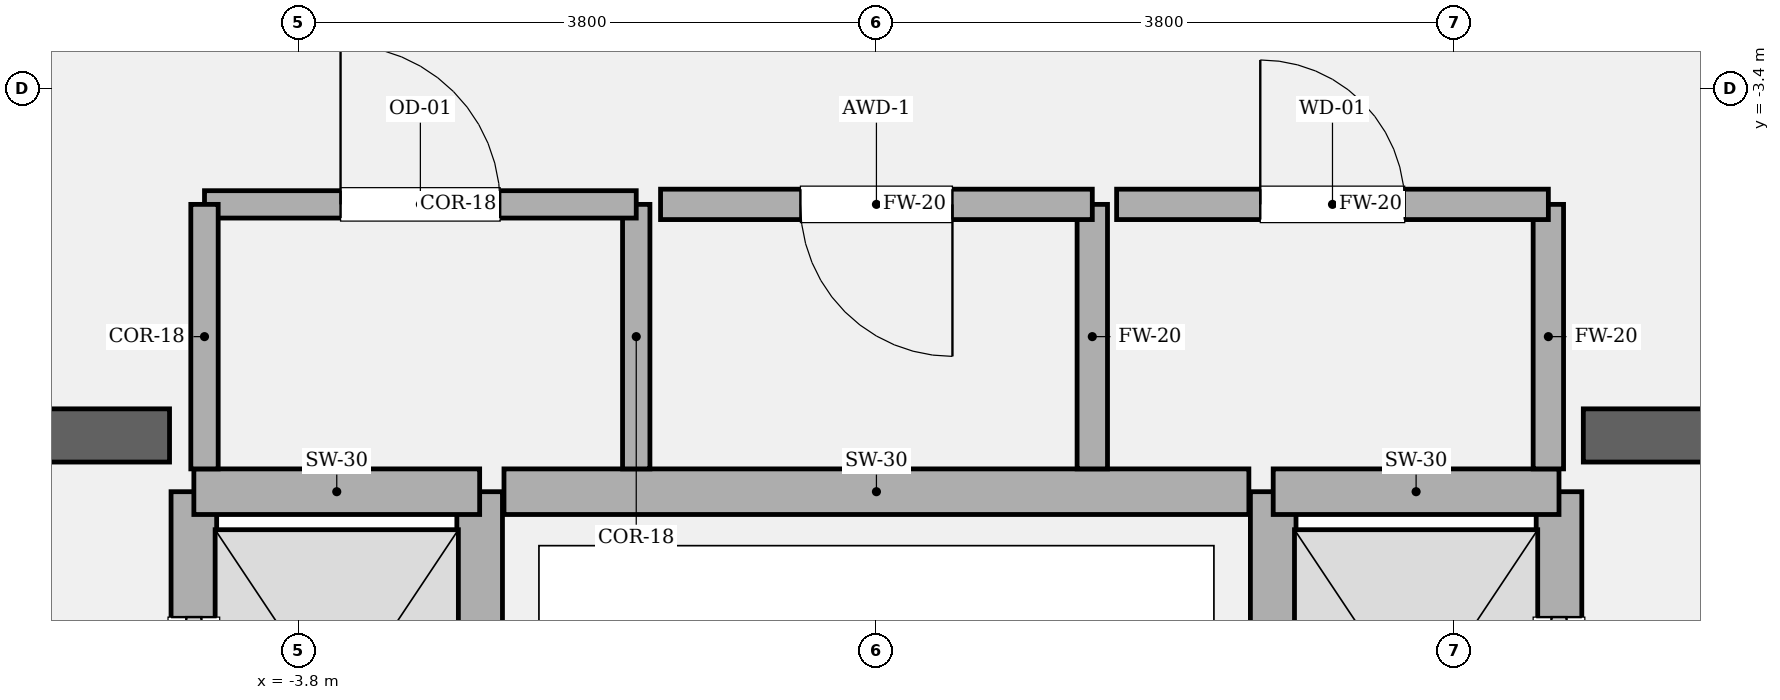
"""IFC4 building model, lengths in metres.
Left out: names, types, materials, properties, quantities, classifications, styles, units other than length and angle.
Written with IfcOpenShell. Run it as: python <this file> out.ifc"""

import sys

from ifc_helpers import new_model, si_unit, direction, frame, frame_2d, origin, place, context, subcontext, project, spatial, rectangle, extrude, element, fill, save


model = new_model("IFC4")
c1 = context("Model", 3, precision=1e-05, world=origin(), true_north=direction((0.0, 1.0)))
c2 = subcontext(c1, "Body", "Model", "MODEL_VIEW")
j1 = project(units=[si_unit("LENGTHUNIT", "METRE"), si_unit("PLANEANGLEUNIT", "RADIAN")], contexts=[c1])
p1 = place(None, origin())
s1 = spatial("IfcSite", under=j1, at=p1, CompositionType="ELEMENT")
p2 = place(p1, origin())
s2 = spatial("IfcBuilding", under=s1, at=p2, CompositionType="ELEMENT")
p3 = place(p2, frame((0.0, 0.0, 97.05)))
s3 = spatial("IfcBuildingStorey", under=s2, at=p3, CompositionType="ELEMENT", Elevation=97.05)
p4 = place(p3, frame((-9.825, -5.68, 0.0), z_axis=(0.0, 0.0, 1.0), x_axis=(1.0, 0.0, 0.0)))
e1 = element("IfcWall", 1, at=p4, inside=s3, PredefinedType="SOLIDWALL", context=c2, shape_type="SweptSolid", body=[
    extrude(rectangle(XDim=5.175, YDim=0.35, at=frame_2d((2.587, 0.0))), origin(), (0.0, 0.0, 1.0), 4.05),
])
p5 = place(p4, frame((1.285, 0.0, 0.0)))
e2 = element("IfcOpeningElement", 2, at=p5, cuts=e1, PredefinedType="OPENING", context=c2, shape_type="SweptSolid", body=[
    extrude(rectangle(XDim=1.18, YDim=2.2, at=frame_2d((0.59, 1.1))), frame((0.0, 0.185, 0.0), z_axis=(0.0, -1.0, 0.0), x_axis=(1.0, 0.0, 0.0)), (0.0, 0.0, 1.0), 0.37),
])
p6 = place(p3, frame((4.65, -5.68, 0.0), z_axis=(0.0, 0.0, 1.0), x_axis=(1.0, 0.0, 0.0)))
e3 = element("IfcWall", 3, at=p6, inside=s3, PredefinedType="SOLIDWALL", context=c2, shape_type="SweptSolid", body=[
    extrude(rectangle(XDim=5.175, YDim=0.35, at=frame_2d((2.587, 0.0))), origin(), (0.0, 0.0, 1.0), 4.05),
])
p7 = place(p6, frame((2.71, 0.0, 0.0)))
e4 = element("IfcOpeningElement", 4, at=p7, cuts=e3, PredefinedType="OPENING", context=c2, shape_type="SweptSolid", body=[
    extrude(rectangle(XDim=1.18, YDim=2.2, at=frame_2d((0.59, 1.1))), frame((0.0, 0.185, 0.0), z_axis=(0.0, -1.0, 0.0), x_axis=(1.0, 0.0, 0.0)), (0.0, 0.0, 1.0), 0.37),
])
p8 = place(p3, frame((-4.49, -8.82, 0.0), z_axis=(0.0, 0.0, 1.0), x_axis=(0.0, 1.0, 0.0)))
e5 = element("IfcWall", 5, at=p8, inside=s3, PredefinedType="SOLIDWALL", context=c2, shape_type="SweptSolid", body=[
    extrude(rectangle(XDim=2.77, YDim=0.3, at=frame_2d((1.385, 0.0))), origin(), (0.0, 0.0, 1.0), 3.81),
])
p9 = place(p8, frame((0.825, 0.0, 0.0)))
e6 = element("IfcOpeningElement", 6, at=p9, cuts=e5, PredefinedType="OPENING", context=c2, shape_type="SweptSolid", body=[
    extrude(rectangle(XDim=1.12, YDim=2.25, at=frame_2d((0.56, 1.125))), frame((0.0, 0.16, 0.0), z_axis=(0.0, -1.0, 0.0), x_axis=(1.0, 0.0, 0.0)), (0.0, 0.0, 1.0), 0.32),
])
p10 = place(p3, frame((-2.61, -8.82, 0.0), z_axis=(0.0, 0.0, 1.0), x_axis=(0.0, 1.0, 0.0)))
e7 = element("IfcWall", 7, at=p10, inside=s3, PredefinedType="SOLIDWALL", context=c2, shape_type="SweptSolid", body=[
    extrude(rectangle(XDim=2.77, YDim=0.3, at=frame_2d((1.385, 0.0))), origin(), (0.0, 0.0, 1.0), 3.81),
])
p11 = place(p3, frame((-4.49, -6.05, 0.0), z_axis=(0.0, 0.0, 1.0), x_axis=(1.0, 0.0, 0.0)))
e8 = element("IfcWall", 8, at=p11, inside=s3, PredefinedType="SOLIDWALL", context=c2, shape_type="SweptSolid", body=[
    extrude(rectangle(XDim=1.88, YDim=0.3, at=frame_2d((0.94, 0.0))), origin(), (0.0, 0.0, 1.0), 3.81),
])
p12 = place(p3, frame((4.49, -8.82, 0.0), z_axis=(0.0, 0.0, 1.0), x_axis=(0.0, 1.0, 0.0)))
e9 = element("IfcWall", 9, at=p12, inside=s3, PredefinedType="SOLIDWALL", context=c2, shape_type="SweptSolid", body=[
    extrude(rectangle(XDim=2.77, YDim=0.3, at=frame_2d((1.385, 0.0))), origin(), (0.0, 0.0, 1.0), 3.81),
])
p13 = place(p12, frame((0.825, 0.0, 0.0)))
e10 = element("IfcOpeningElement", 10, at=p13, cuts=e9, PredefinedType="OPENING", context=c2, shape_type="SweptSolid", body=[
    extrude(rectangle(XDim=1.12, YDim=2.25, at=frame_2d((0.56, 1.125))), frame((0.0, 0.16, 0.0), z_axis=(0.0, -1.0, 0.0), x_axis=(1.0, 0.0, 0.0)), (0.0, 0.0, 1.0), 0.32),
])
p14 = place(p3, frame((2.61, -8.82, 0.0), z_axis=(0.0, 0.0, 1.0), x_axis=(0.0, 1.0, 0.0)))
e11 = element("IfcWall", 11, at=p14, inside=s3, PredefinedType="SOLIDWALL", context=c2, shape_type="SweptSolid", body=[
    extrude(rectangle(XDim=2.77, YDim=0.3, at=frame_2d((1.385, 0.0))), origin(), (0.0, 0.0, 1.0), 3.81),
])
p15 = place(p3, frame((2.61, -6.05, 0.0), z_axis=(0.0, 0.0, 1.0), x_axis=(1.0, 0.0, 0.0)))
e12 = element("IfcWall", 12, at=p15, inside=s3, PredefinedType="SOLIDWALL", context=c2, shape_type="SweptSolid", body=[
    extrude(rectangle(XDim=1.88, YDim=0.3, at=frame_2d((0.94, 0.0))), origin(), (0.0, 0.0, 1.0), 3.81),
])
p16 = place(p3, frame((-2.45, -6.05, 0.0), z_axis=(0.0, 0.0, 1.0), x_axis=(1.0, 0.0, 0.0)))
e13 = element("IfcWall", 13, at=p16, inside=s3, PredefinedType="SOLIDWALL", context=c2, shape_type="SweptSolid", body=[
    extrude(rectangle(XDim=4.9, YDim=0.3, at=frame_2d((2.45, 0.0))), origin(), (0.0, 0.0, 1.0), 3.81),
])
p17 = place(p3, frame((-1.58, -5.9, 0.0), z_axis=(0.0, 0.0, 1.0), x_axis=(0.0, 1.0, 0.0)))
e14 = element("IfcWall", 14, at=p17, inside=s3, PredefinedType="PARTITIONING", context=c2, shape_type="SweptSolid", body=[
    extrude(rectangle(XDim=1.74, YDim=0.18, at=frame_2d((0.87, 0.0))), origin(), (0.0, 0.0, 1.0), 3.81),
])
p18 = place(p3, frame((-1.58, -4.16, 0.0), z_axis=(0.0, 0.0, 1.0), x_axis=(-1.0, 0.0, 0.0)))
e15 = element("IfcWall", 15, at=p18, inside=s3, PredefinedType="PARTITIONING", context=c2, shape_type="SweptSolid", body=[
    extrude(rectangle(XDim=2.84, YDim=0.18, at=frame_2d((1.42, 0.0))), origin(), (0.0, 0.0, 1.0), 3.81),
])
p19 = place(p18, frame((0.895, 0.0, 0.0)))
e16 = element("IfcOpeningElement", 16, at=p19, cuts=e15, PredefinedType="OPENING", context=c2, shape_type="SweptSolid", body=[
    extrude(rectangle(XDim=1.05, YDim=2.2, at=frame_2d((0.525, 1.1))), frame((0.0, 0.1, 0.0), z_axis=(0.0, -1.0, 0.0), x_axis=(1.0, 0.0, 0.0)), (0.0, 0.0, 1.0), 0.2),
])
p20 = place(p3, frame((-4.42, -4.16, 0.0), z_axis=(0.0, 0.0, 1.0), x_axis=(0.0, -1.0, 0.0)))
e17 = element("IfcWall", 17, at=p20, inside=s3, PredefinedType="PARTITIONING", context=c2, shape_type="SweptSolid", body=[
    extrude(rectangle(XDim=1.74, YDim=0.18, at=frame_2d((0.87, 0.0))), origin(), (0.0, 0.0, 1.0), 3.81),
])
p21 = place(p3, frame((1.42, -5.9, 0.0), z_axis=(0.0, 0.0, 1.0), x_axis=(0.0, 1.0, 0.0)))
e18 = element("IfcWall", 18, at=p21, inside=s3, PredefinedType="SOLIDWALL", context=c2, shape_type="SweptSolid", body=[
    extrude(rectangle(XDim=1.74, YDim=0.2, at=frame_2d((0.87, 0.0))), origin(), (0.0, 0.0, 1.0), 3.81),
])
p22 = place(p3, frame((1.42, -4.16, 0.0), z_axis=(0.0, 0.0, 1.0), x_axis=(-1.0, 0.0, 0.0)))
e19 = element("IfcWall", 19, at=p22, inside=s3, PredefinedType="SOLIDWALL", context=c2, shape_type="SweptSolid", body=[
    extrude(rectangle(XDim=2.84, YDim=0.2, at=frame_2d((1.42, 0.0))), origin(), (0.0, 0.0, 1.0), 3.81),
])
p23 = place(p22, frame((0.92, 0.0, 0.0)))
e20 = element("IfcOpeningElement", 20, at=p23, cuts=e19, PredefinedType="OPENING", context=c2, shape_type="SweptSolid", body=[
    extrude(rectangle(XDim=1.0, YDim=2.15, at=frame_2d((0.5, 1.075))), frame((0.0, 0.11, 0.0), z_axis=(0.0, -1.0, 0.0), x_axis=(1.0, 0.0, 0.0)), (0.0, 0.0, 1.0), 0.22),
])
p24 = place(p3, frame((4.42, -5.9, 0.0), z_axis=(0.0, 0.0, 1.0), x_axis=(0.0, 1.0, 0.0)))
e21 = element("IfcWall", 21, at=p24, inside=s3, PredefinedType="SOLIDWALL", context=c2, shape_type="SweptSolid", body=[
    extrude(rectangle(XDim=1.74, YDim=0.2, at=frame_2d((0.87, 0.0))), origin(), (0.0, 0.0, 1.0), 3.81),
])
p25 = place(p3, frame((4.42, -4.16, 0.0), z_axis=(0.0, 0.0, 1.0), x_axis=(-1.0, 0.0, 0.0)))
e22 = element("IfcWall", 22, at=p25, inside=s3, PredefinedType="SOLIDWALL", context=c2, shape_type="SweptSolid", body=[
    extrude(rectangle(XDim=2.84, YDim=0.2, at=frame_2d((1.42, 0.0))), origin(), (0.0, 0.0, 1.0), 3.81),
])
p26 = place(p25, frame((0.945, 0.0, 0.0)))
e23 = element("IfcOpeningElement", 23, at=p26, cuts=e22, PredefinedType="OPENING", context=c2, shape_type="SweptSolid", body=[
    extrude(rectangle(XDim=0.95, YDim=2.15, at=frame_2d((0.475, 1.075))), frame((0.0, 0.11, 0.0), z_axis=(0.0, -1.0, 0.0), x_axis=(1.0, 0.0, 0.0)), (0.0, 0.0, 1.0), 0.22),
])
p27 = place(p9, origin())
e24 = element("IfcDoor", 24, at=p27, inside=s3, OperationType="SLIDING_TO_LEFT", PredefinedType="DOOR", context=c2, shape_type="SweptSolid", body=[
    extrude(rectangle(XDim=1.12, YDim=2.25, at=frame_2d((0.56, 1.125))), frame((0.0, 0.025, 0.0), z_axis=(0.0, -1.0, 0.0), x_axis=(1.0, 0.0, 0.0)), (0.0, 0.0, 1.0), 0.05),
])
fill(e6, e24)
p28 = place(p13, origin())
e25 = element("IfcDoor", 25, at=p28, inside=s3, OperationType="SLIDING_TO_RIGHT", PredefinedType="DOOR", context=c2, shape_type="SweptSolid", body=[
    extrude(rectangle(XDim=1.12, YDim=2.25, at=frame_2d((0.56, 1.125))), frame((0.0, 0.025, 0.0), z_axis=(0.0, -1.0, 0.0), x_axis=(1.0, 0.0, 0.0)), (0.0, 0.0, 1.0), 0.05),
])
fill(e10, e25)
p29 = place(p19, origin())
e26 = element("IfcDoor", 26, at=p29, inside=s3, OperationType="SINGLE_SWING_RIGHT", PredefinedType="DOOR", context=c2, shape_type="SweptSolid", body=[
    extrude(rectangle(XDim=1.05, YDim=2.2, at=frame_2d((0.525, 1.1))), frame((0.0, 0.025, 0.0), z_axis=(0.0, -1.0, 0.0), x_axis=(1.0, 0.0, 0.0)), (0.0, 0.0, 1.0), 0.05),
])
fill(e16, e26)
p30 = place(p23, origin())
e27 = element("IfcDoor", 27, at=p30, inside=s3, OperationType="SINGLE_SWING_LEFT", PredefinedType="DOOR", context=c2, shape_type="SweptSolid", body=[
    extrude(rectangle(XDim=1.0, YDim=2.15, at=frame_2d((0.5, 1.075))), frame((0.0, 0.025, 0.0), z_axis=(0.0, -1.0, 0.0), x_axis=(1.0, 0.0, 0.0)), (0.0, 0.0, 1.0), 0.05),
])
fill(e20, e27)
p31 = place(p26, origin())
e28 = element("IfcDoor", 28, at=p31, inside=s3, OperationType="SINGLE_SWING_RIGHT", PredefinedType="DOOR", context=c2, shape_type="SweptSolid", body=[
    extrude(rectangle(XDim=0.95, YDim=2.15, at=frame_2d((0.475, 1.075))), frame((0.0, 0.025, 0.0), z_axis=(0.0, -1.0, 0.0), x_axis=(1.0, 0.0, 0.0)), (0.0, 0.0, 1.0), 0.05),
])
fill(e23, e28)
save(model, sys.argv[1])
